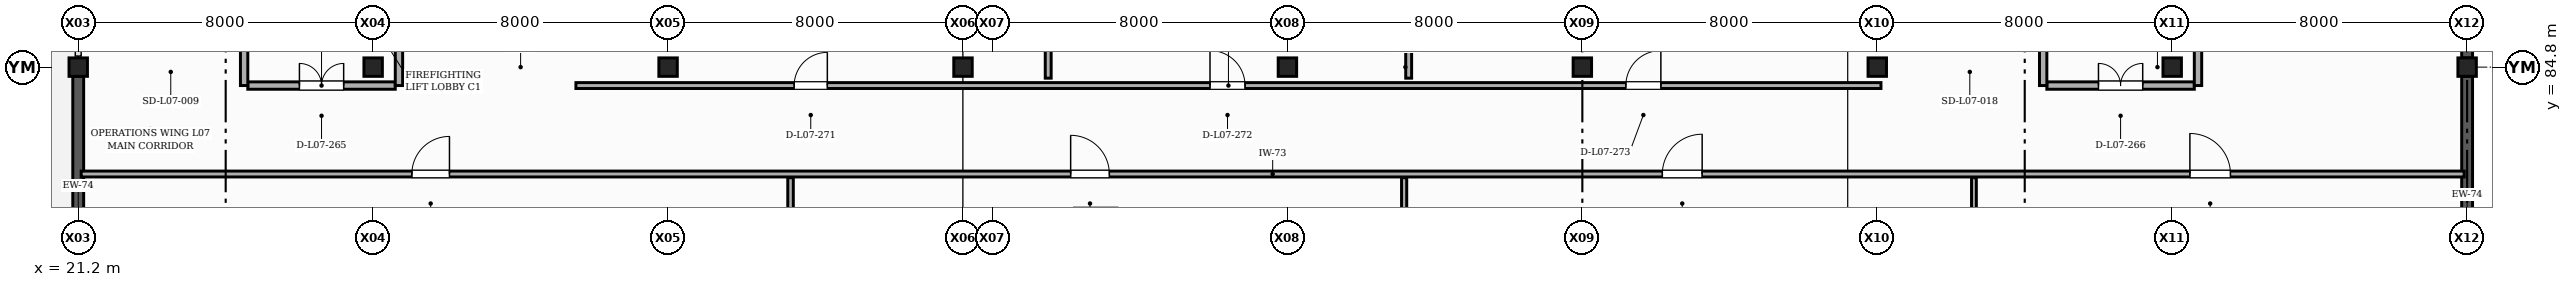
"""IFC4 building model, lengths in metres.
Left out: names, types, materials, properties, quantities, classifications, styles, units other than length and angle.
Written with IfcOpenShell. Run it as: python <this file> out.ifc"""

import sys

from ifc_helpers import new_model, si_unit, direction, frame, frame_2d, origin, origin_2d, place, context, subcontext, project, spatial, rectangle, extrude, element, fill, save


model = new_model("IFC4")
c1 = context("Model", 3, precision=1e-05, world=origin(), true_north=direction((0.0, 1.0)))
c2 = subcontext(c1, "Body", "Model", "MODEL_VIEW")
j1 = project(units=[si_unit("LENGTHUNIT", "METRE"), si_unit("PLANEANGLEUNIT", "RADIAN")], contexts=[c1])
p1 = place(None, origin())
s1 = spatial("IfcSite", under=j1, at=p1, CompositionType="ELEMENT")
p2 = place(p1, origin())
s2 = spatial("IfcBuilding", under=s1, at=p2, CompositionType="ELEMENT")
p3 = place(p2, frame((0.0, 0.0, 29.7)))
s3 = spatial("IfcBuildingStorey", under=s2, at=p3, CompositionType="ELEMENT", Elevation=29.7)
for number, where, z_axis, x_axis in (
    (1, (21.2, 84.8, 0.0), (0.0, 0.0, 1.0), (1.0, 0.0, 0.0)),
    (2, (29.2, 84.8, 0.0), (0.0, 0.0, 1.0), (1.0, 0.0, 0.0)),
    (3, (37.2, 84.8, 0.0), (0.0, 0.0, 1.0), (1.0, 0.0, 0.0)),
    (4, (45.2, 84.8, 0.0), (0.0, 0.0, 1.0), (1.0, 0.0, 0.0)),
    (5, (54.0, 84.8, 0.0), (0.0, 0.0, 1.0), (1.0, 0.0, 0.0)),
    (6, (62.0, 84.8, 0.0), (0.0, 0.0, 1.0), (1.0, 0.0, 0.0)),
    (7, (70.0, 84.8, 0.0), (0.0, 0.0, 1.0), (1.0, 0.0, 0.0)),
    (8, (78.0, 84.8, 0.0), (0.0, 0.0, 1.0), (1.0, 0.0, 0.0)),
    (9, (86.0, 84.8, 0.0), (0.0, 0.0, 1.0), (1.0, 0.0, 0.0)),
):
    element("IfcColumn", number, at=place(p3, frame(where, z_axis=z_axis, x_axis=x_axis)), inside=s3, PredefinedType="COLUMN", context=c2, shape_type="SweptSolid", body=[
        extrude(rectangle(XDim=0.5, YDim=0.5, at=origin_2d()), origin(), (0.0, 0.0, 1.0), 3.9),
    ])
p4 = place(p3, frame((86.0, 77.05, 0.0), z_axis=(0.0, 0.0, 1.0), x_axis=(0.0, 1.0, 0.0)))
e10 = element("IfcWall", 10, at=p4, inside=s3, PredefinedType="SOLIDWALL", context=c2, shape_type="SweptSolid", body=[
    extrude(rectangle(XDim=7.5, YDim=0.295, at=frame_2d((3.75, 0.0))), origin(), (0.0, 0.0, 1.0), 2.98),
])
p5 = place(p3, frame((86.0, 85.05, 0.0), z_axis=(0.0, 0.0, 1.0), x_axis=(0.0, 1.0, 0.0)))
e11 = element("IfcWall", 11, at=p5, inside=s3, PredefinedType="SOLIDWALL", context=c2, shape_type="SweptSolid", body=[
    extrude(rectangle(XDim=7.5, YDim=0.295, at=frame_2d((3.75, 0.0))), origin(), (0.0, 0.0, 1.0), 2.98),
])
p6 = place(p5, frame((2.85, 0.0, 0.9)))
e12 = element("IfcOpeningElement", 12, at=p6, cuts=e11, PredefinedType="OPENING", context=c2, shape_type="SweptSolid", body=[
    extrude(rectangle(XDim=1.8, YDim=1.4, at=frame_2d((0.9, 0.7))), frame((0.0, 0.157, 0.0), z_axis=(0.0, -1.0, 0.0), x_axis=(1.0, 0.0, 0.0)), (0.0, 0.0, 1.0), 0.315),
])
p7 = place(p3, frame((21.2, 84.55, 0.0), z_axis=(0.0, 0.0, 1.0), x_axis=(0.0, -1.0, 0.0)))
e13 = element("IfcWall", 13, at=p7, inside=s3, PredefinedType="SOLIDWALL", context=c2, shape_type="SweptSolid", body=[
    extrude(rectangle(XDim=7.5, YDim=0.295, at=frame_2d((3.75, 0.0))), origin(), (0.0, 0.0, 1.0), 2.98),
])
p8 = place(p7, frame((3.85, 0.0, 0.0)))
e14 = element("IfcOpeningElement", 14, at=p8, cuts=e13, PredefinedType="OPENING", context=c2, shape_type="SweptSolid", body=[
    extrude(rectangle(XDim=1.0, YDim=2.15, at=frame_2d((0.5, 1.075))), frame((0.0, 0.157, 0.0), z_axis=(0.0, -1.0, 0.0), x_axis=(1.0, 0.0, 0.0)), (0.0, 0.0, 1.0), 0.315),
])
p9 = place(p3, frame((25.8, 84.3, 0.0), z_axis=(0.0, 0.0, 1.0), x_axis=(1.0, 0.0, 0.0)))
e15 = element("IfcWall", 15, at=p9, inside=s3, PredefinedType="PARTITIONING", context=c2, shape_type="SweptSolid", body=[
    extrude(rectangle(XDim=4.0, YDim=0.2, at=frame_2d((2.0, 0.0))), origin(), (0.0, 0.0, 1.0), 2.915),
])
p10 = place(p9, frame((1.4, 0.0, 0.0)))
e16 = element("IfcOpeningElement", 16, at=p10, cuts=e15, PredefinedType="OPENING", context=c2, shape_type="SweptSolid", body=[
    extrude(rectangle(XDim=1.2, YDim=2.15, at=frame_2d((0.6, 1.075))), frame((0.0, 0.11, 0.0), z_axis=(0.0, -1.0, 0.0), x_axis=(1.0, 0.0, 0.0)), (0.0, 0.0, 1.0), 0.22),
])
p11 = place(p3, frame((25.7, 84.3, 0.0), z_axis=(0.0, 0.0, 1.0), x_axis=(0.0, 1.0, 0.0)))
e17 = element("IfcWall", 17, at=p11, inside=s3, PredefinedType="PARTITIONING", context=c2, shape_type="SweptSolid", body=[
    extrude(rectangle(XDim=4.8, YDim=0.2, at=frame_2d((2.4, 0.0))), origin(), (0.0, 0.0, 1.0), 3.065),
])
p12 = place(p3, frame((29.9, 84.3, 0.0), z_axis=(0.0, 0.0, 1.0), x_axis=(0.0, 1.0, 0.0)))
e18 = element("IfcWall", 18, at=p12, inside=s3, PredefinedType="PARTITIONING", context=c2, shape_type="SweptSolid", body=[
    extrude(rectangle(XDim=4.8, YDim=0.2, at=frame_2d((2.4, 0.0))), origin(), (0.0, 0.0, 1.0), 2.765),
])
p13 = place(p3, frame((74.6, 84.3, 0.0), z_axis=(0.0, 0.0, 1.0), x_axis=(1.0, 0.0, 0.0)))
e19 = element("IfcWall", 19, at=p13, inside=s3, PredefinedType="PARTITIONING", context=c2, shape_type="SweptSolid", body=[
    extrude(rectangle(XDim=4.0, YDim=0.2, at=frame_2d((2.0, 0.0))), origin(), (0.0, 0.0, 1.0), 2.915),
])
p14 = place(p13, frame((1.4, 0.0, 0.0)))
e20 = element("IfcOpeningElement", 20, at=p14, cuts=e19, PredefinedType="OPENING", context=c2, shape_type="SweptSolid", body=[
    extrude(rectangle(XDim=1.2, YDim=2.15, at=frame_2d((0.6, 1.075))), frame((0.0, 0.11, 0.0), z_axis=(0.0, -1.0, 0.0), x_axis=(1.0, 0.0, 0.0)), (0.0, 0.0, 1.0), 0.22),
])
p15 = place(p3, frame((74.5, 84.3, 0.0), z_axis=(0.0, 0.0, 1.0), x_axis=(0.0, 1.0, 0.0)))
e21 = element("IfcWall", 21, at=p15, inside=s3, PredefinedType="PARTITIONING", context=c2, shape_type="SweptSolid", body=[
    extrude(rectangle(XDim=4.8, YDim=0.2, at=frame_2d((2.4, 0.0))), origin(), (0.0, 0.0, 1.0), 3.065),
])
p16 = place(p3, frame((78.7, 84.3, 0.0), z_axis=(0.0, 0.0, 1.0), x_axis=(0.0, 1.0, 0.0)))
e22 = element("IfcWall", 22, at=p16, inside=s3, PredefinedType="PARTITIONING", context=c2, shape_type="SweptSolid", body=[
    extrude(rectangle(XDim=4.8, YDim=0.2, at=frame_2d((2.4, 0.0))), origin(), (0.0, 0.0, 1.0), 2.765),
])
p17 = place(p3, frame((40.522, 76.88, 0.0), z_axis=(0.0, 0.0, 1.0), x_axis=(0.0, 1.0, 0.0)))
e23 = element("IfcWall", 23, at=p17, inside=s3, PredefinedType="PARTITIONING", context=c2, shape_type="SweptSolid", body=[
    extrude(rectangle(XDim=4.92, YDim=0.15, at=frame_2d((2.46, 0.0))), origin(), (0.0, 0.0, 1.0), 2.965),
])
p18 = place(p3, frame((57.166, 76.88, 0.0), z_axis=(0.0, 0.0, 1.0), x_axis=(0.0, 1.0, 0.0)))
e24 = element("IfcWall", 24, at=p18, inside=s3, PredefinedType="PARTITIONING", context=c2, shape_type="SweptSolid", body=[
    extrude(rectangle(XDim=4.92, YDim=0.14, at=frame_2d((2.46, 0.0))), origin(), (0.0, 0.0, 1.0), 2.965),
])
p19 = place(p3, frame((72.622, 76.88, 0.0), z_axis=(0.0, 0.0, 1.0), x_axis=(0.0, 1.0, 0.0)))
e25 = element("IfcWall", 25, at=p19, inside=s3, PredefinedType="PARTITIONING", context=c2, shape_type="SweptSolid", body=[
    extrude(rectangle(XDim=4.92, YDim=0.13, at=frame_2d((2.46, 0.0))), origin(), (0.0, 0.0, 1.0), 2.965),
])
p20 = place(p3, frame((21.28, 81.9, 0.0), z_axis=(0.0, 0.0, 1.0), x_axis=(1.0, 0.0, 0.0)))
e26 = element("IfcWall", 26, at=p20, inside=s3, PredefinedType="PARTITIONING", context=c2, shape_type="SweptSolid", body=[
    extrude(rectangle(XDim=64.64, YDim=0.16, at=frame_2d((32.32, 0.0))), origin(), (0.0, 0.0, 1.0), 2.915),
])
p21 = place(p20, frame((8.97, 0.0, 0.0)))
e27 = element("IfcOpeningElement", 27, at=p21, cuts=e26, PredefinedType="OPENING", context=c2, shape_type="SweptSolid", body=[
    extrude(rectangle(XDim=1.02, YDim=2.12, at=frame_2d((0.51, 1.06))), frame((0.0, 0.09, 0.0), z_axis=(0.0, -1.0, 0.0), x_axis=(1.0, 0.0, 0.0)), (0.0, 0.0, 1.0), 0.18),
])
p22 = place(p20, frame((26.84, 0.0, 0.0)))
e28 = element("IfcOpeningElement", 28, at=p22, cuts=e26, PredefinedType="OPENING", context=c2, shape_type="SweptSolid", body=[
    extrude(rectangle(XDim=1.05, YDim=2.1, at=frame_2d((0.525, 1.05))), frame((0.0, 0.09, 0.0), z_axis=(0.0, -1.0, 0.0), x_axis=(1.0, 0.0, 0.0)), (0.0, 0.0, 1.0), 0.18),
])
p23 = place(p20, frame((42.89, 0.0, 0.0)))
e29 = element("IfcOpeningElement", 29, at=p23, cuts=e26, PredefinedType="OPENING", context=c2, shape_type="SweptSolid", body=[
    extrude(rectangle(XDim=1.08, YDim=2.14, at=frame_2d((0.54, 1.07))), frame((0.0, 0.09, 0.0), z_axis=(0.0, -1.0, 0.0), x_axis=(1.0, 0.0, 0.0)), (0.0, 0.0, 1.0), 0.18),
])
p24 = place(p20, frame((57.2, 0.0, 0.0)))
e30 = element("IfcOpeningElement", 30, at=p24, cuts=e26, PredefinedType="OPENING", context=c2, shape_type="SweptSolid", body=[
    extrude(rectangle(XDim=1.1, YDim=2.1, at=frame_2d((0.55, 1.05))), frame((0.0, 0.09, 0.0), z_axis=(0.0, -1.0, 0.0), x_axis=(1.0, 0.0, 0.0)), (0.0, 0.0, 1.0), 0.18),
])
p25 = place(p3, frame((47.511, 84.5, 0.0), z_axis=(0.0, 0.0, 1.0), x_axis=(0.0, 1.0, 0.0)))
e31 = element("IfcWall", 31, at=p25, inside=s3, PredefinedType="PARTITIONING", context=c2, shape_type="SweptSolid", body=[
    extrude(rectangle(XDim=8.22, YDim=0.16, at=frame_2d((4.11, 0.0))), origin(), (0.0, 0.0, 1.0), 2.915),
])
p26 = place(p3, frame((57.289, 84.5, 0.0), z_axis=(0.0, 0.0, 1.0), x_axis=(0.0, 1.0, 0.0)))
e32 = element("IfcWall", 32, at=p26, inside=s3, PredefinedType="PARTITIONING", context=c2, shape_type="SweptSolid", body=[
    extrude(rectangle(XDim=8.22, YDim=0.16, at=frame_2d((4.11, 0.0))), origin(), (0.0, 0.0, 1.0), 2.965),
])
p27 = place(p3, frame((34.7, 84.3, 0.0), z_axis=(0.0, 0.0, 1.0), x_axis=(1.0, 0.0, 0.0)))
e33 = element("IfcWall", 33, at=p27, inside=s3, PredefinedType="PARTITIONING", context=c2, shape_type="SweptSolid", body=[
    extrude(rectangle(XDim=35.4, YDim=0.16, at=frame_2d((17.7, 0.0))), origin(), (0.0, 0.0, 1.0), 2.915),
])
p28 = place(p27, frame((5.92, 0.0, 0.0)))
e34 = element("IfcOpeningElement", 34, at=p28, cuts=e33, PredefinedType="OPENING", context=c2, shape_type="SweptSolid", body=[
    extrude(rectangle(XDim=0.9, YDim=2.1, at=frame_2d((0.45, 1.05))), frame((0.0, 0.09, 0.0), z_axis=(0.0, -1.0, 0.0), x_axis=(1.0, 0.0, 0.0)), (0.0, 0.0, 1.0), 0.18),
])
p29 = place(p27, frame((17.2, 0.0, 0.0)))
e35 = element("IfcOpeningElement", 35, at=p29, cuts=e33, PredefinedType="OPENING", context=c2, shape_type="SweptSolid", body=[
    extrude(rectangle(XDim=0.95, YDim=2.15, at=frame_2d((0.475, 1.075))), frame((0.0, 0.09, 0.0), z_axis=(0.0, -1.0, 0.0), x_axis=(1.0, 0.0, 0.0)), (0.0, 0.0, 1.0), 0.18),
])
p30 = place(p27, frame((28.48, 0.0, 0.0)))
e36 = element("IfcOpeningElement", 36, at=p30, cuts=e33, PredefinedType="OPENING", context=c2, shape_type="SweptSolid", body=[
    extrude(rectangle(XDim=0.95, YDim=2.1, at=frame_2d((0.475, 1.05))), frame((0.0, 0.09, 0.0), z_axis=(0.0, -1.0, 0.0), x_axis=(1.0, 0.0, 0.0)), (0.0, 0.0, 1.0), 0.18),
])
p31 = place(p10, origin())
e37 = element("IfcDoor", 37, at=p31, inside=s3, OperationType="DOUBLE_DOOR_SINGLE_SWING", PredefinedType="DOOR", context=c2, shape_type="SweptSolid", body=[
    extrude(rectangle(XDim=1.2, YDim=2.15, at=frame_2d((0.6, 1.075))), frame((0.0, 0.025, 0.0), z_axis=(0.0, -1.0, 0.0), x_axis=(1.0, 0.0, 0.0)), (0.0, 0.0, 1.0), 0.05),
])
fill(e16, e37)
p32 = place(p14, origin())
e38 = element("IfcDoor", 38, at=p32, inside=s3, OperationType="DOUBLE_DOOR_SINGLE_SWING", PredefinedType="DOOR", context=c2, shape_type="SweptSolid", body=[
    extrude(rectangle(XDim=1.2, YDim=2.15, at=frame_2d((0.6, 1.075))), frame((0.0, 0.025, 0.0), z_axis=(0.0, -1.0, 0.0), x_axis=(1.0, 0.0, 0.0)), (0.0, 0.0, 1.0), 0.05),
])
fill(e20, e38)
p33 = place(p21, origin())
e39 = element("IfcDoor", 39, at=p33, inside=s3, OperationType="SINGLE_SWING_RIGHT", PredefinedType="DOOR", context=c2, shape_type="SweptSolid", body=[
    extrude(rectangle(XDim=1.02, YDim=2.12, at=frame_2d((0.51, 1.06))), frame((0.0, 0.025, 0.0), z_axis=(0.0, -1.0, 0.0), x_axis=(1.0, 0.0, 0.0)), (0.0, 0.0, 1.0), 0.05),
])
fill(e27, e39)
p34 = place(p22, origin())
e40 = element("IfcDoor", 40, at=p34, inside=s3, OperationType="SINGLE_SWING_LEFT", PredefinedType="DOOR", context=c2, shape_type="SweptSolid", body=[
    extrude(rectangle(XDim=1.05, YDim=2.1, at=frame_2d((0.525, 1.05))), frame((0.0, 0.025, 0.0), z_axis=(0.0, -1.0, 0.0), x_axis=(1.0, 0.0, 0.0)), (0.0, 0.0, 1.0), 0.05),
])
fill(e28, e40)
p35 = place(p23, origin())
e41 = element("IfcDoor", 41, at=p35, inside=s3, OperationType="SINGLE_SWING_RIGHT", PredefinedType="DOOR", context=c2, shape_type="SweptSolid", body=[
    extrude(rectangle(XDim=1.08, YDim=2.14, at=frame_2d((0.54, 1.07))), frame((0.0, 0.025, 0.0), z_axis=(0.0, -1.0, 0.0), x_axis=(1.0, 0.0, 0.0)), (0.0, 0.0, 1.0), 0.05),
])
fill(e29, e41)
p36 = place(p24, origin())
e42 = element("IfcDoor", 42, at=p36, inside=s3, OperationType="SINGLE_SWING_LEFT", PredefinedType="DOOR", context=c2, shape_type="SweptSolid", body=[
    extrude(rectangle(XDim=1.1, YDim=2.1, at=frame_2d((0.55, 1.05))), frame((0.0, 0.025, 0.0), z_axis=(0.0, -1.0, 0.0), x_axis=(1.0, 0.0, 0.0)), (0.0, 0.0, 1.0), 0.05),
])
fill(e30, e42)
p37 = place(p28, origin())
e43 = element("IfcDoor", 43, at=p37, inside=s3, OperationType="SINGLE_SWING_RIGHT", PredefinedType="DOOR", context=c2, shape_type="SweptSolid", body=[
    extrude(rectangle(XDim=0.9, YDim=2.1, at=frame_2d((0.45, 1.05))), frame((0.0, 0.025, 0.0), z_axis=(0.0, -1.0, 0.0), x_axis=(1.0, 0.0, 0.0)), (0.0, 0.0, 1.0), 0.05),
])
fill(e34, e43)
p38 = place(p29, origin())
e44 = element("IfcDoor", 44, at=p38, inside=s3, OperationType="SINGLE_SWING_LEFT", PredefinedType="DOOR", context=c2, shape_type="SweptSolid", body=[
    extrude(rectangle(XDim=0.95, YDim=2.15, at=frame_2d((0.475, 1.075))), frame((0.0, 0.025, 0.0), z_axis=(0.0, -1.0, 0.0), x_axis=(1.0, 0.0, 0.0)), (0.0, 0.0, 1.0), 0.05),
])
fill(e35, e44)
p39 = place(p30, origin())
e45 = element("IfcDoor", 45, at=p39, inside=s3, OperationType="SINGLE_SWING_RIGHT", PredefinedType="DOOR", context=c2, shape_type="SweptSolid", body=[
    extrude(rectangle(XDim=0.95, YDim=2.1, at=frame_2d((0.475, 1.05))), frame((0.0, 0.025, 0.0), z_axis=(0.0, -1.0, 0.0), x_axis=(1.0, 0.0, 0.0)), (0.0, 0.0, 1.0), 0.05),
])
fill(e36, e45)
save(model, sys.argv[1])
